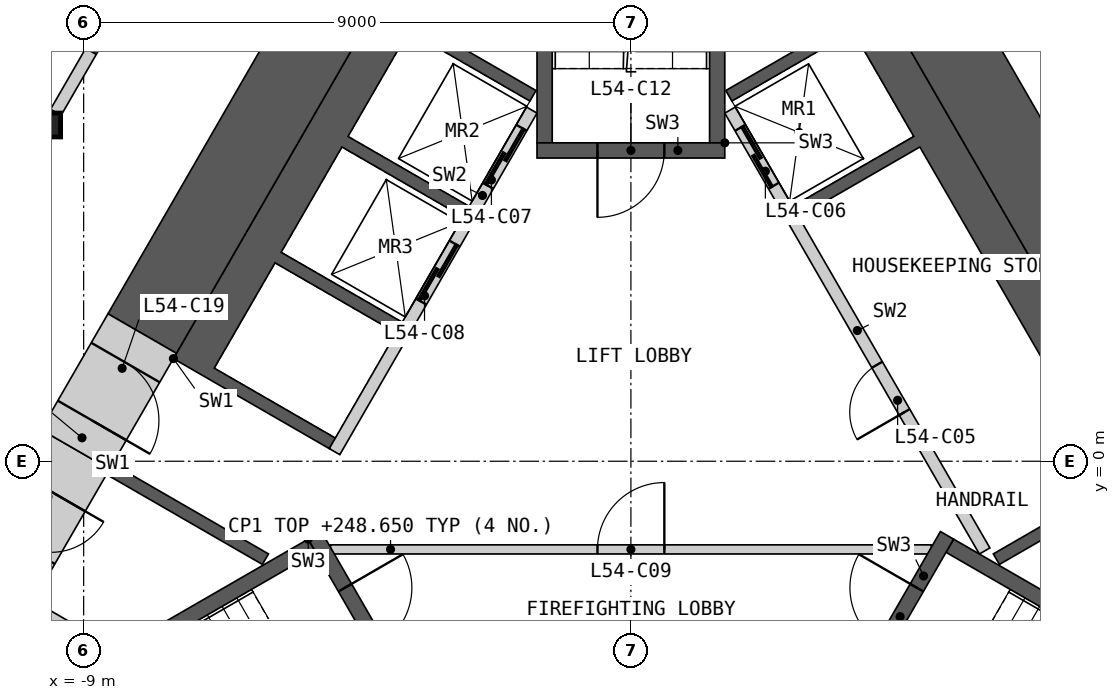
"""IFC4 building model, lengths in metres.
Left out: names, types, materials, properties, quantities, classifications, styles, units other than length and angle.
Written with IfcOpenShell. Run it as: python <this file> out.ifc"""

import sys

from ifc_helpers import new_model, si_unit, direction, frame, frame_2d, origin, origin_2d, place, context, subcontext, project, spatial, polyline, rectangle, i_section, outline, extrude, element, fill, save


model = new_model("IFC4")
c1 = context("Model", 3, precision=1e-05, world=origin(), true_north=direction((0.0, 1.0)))
c2 = subcontext(c1, "Body", "Model", "MODEL_VIEW")
j1 = project(units=[si_unit("LENGTHUNIT", "METRE"), si_unit("PLANEANGLEUNIT", "RADIAN")], contexts=[c1])
p1 = place(None, origin())
s1 = spatial("IfcSite", under=j1, at=p1, CompositionType="ELEMENT")
p2 = place(p1, origin())
s2 = spatial("IfcBuilding", under=s1, at=p2, CompositionType="ELEMENT")
p3 = place(p2, frame((0.0, 0.0, 245.4)))
s3 = spatial("IfcBuildingStorey", under=s2, at=p3, CompositionType="ELEMENT", Elevation=245.4)
p4 = place(p3, frame((-9.578, 5.53, 0.0), z_axis=(0.0, 0.0, 1.0), x_axis=(1.0, 0.0, 0.0)))
e1 = element("IfcColumn", 1, at=p4, inside=s3, PredefinedType="COLUMN", context=c2, shape_type="SweptSolid", body=[
    extrude(i_section(OverallWidth=0.399, OverallDepth=0.393, WebThickness=0.023, FlangeThickness=0.037, at=origin_2d()), origin(), (0.0, 0.0, 1.0), 3.6),
])
p5 = place(p3, origin())
e2 = element("IfcWall", 2, at=p5, inside=s3, PredefinedType="SHEAR", context=c2, shape_type="SweptSolid", body=[
    extrude(outline(polyline([(4.124, 7.577), (8.624, -0.217), (8.231, -0.444), (6.061, -1.697), (5.96, -1.524), (7.952, -0.374), (4.752, 5.169), (2.76, 4.019), (2.66, 4.192), (4.652, 5.342), (3.652, 7.074), (1.66, 5.924), (1.561, 6.097), (3.731, 7.35), (4.124, 7.577)])), origin(), (0.0, 0.0, 1.0), 3.25),
])
p6 = place(p3, frame((5.817, -1.476, 0.0), z_axis=(0.0, 0.0, 1.0), x_axis=(-0.500002616675, 0.866023893041, 0.0)))
e3 = element("IfcWall", 3, at=p6, inside=s3, PredefinedType="SOLIDWALL", context=c2, shape_type="SweptSolid", body=[
    extrude(rectangle(XDim=8.373, YDim=0.2, at=frame_2d((4.187, 0.0))), origin(), (0.0, 0.0, 1.0), 3.25),
])
p7 = place(p6, frame((2.637, 0.0, 0.0)))
e4 = element("IfcOpeningElement", 4, at=p7, cuts=e3, PredefinedType="OPENING", context=c2, shape_type="SweptSolid", body=[
    extrude(rectangle(XDim=0.9, YDim=2.1, at=frame_2d((0.45, 1.05))), frame((0.0, 0.11, 0.0), z_axis=(0.0, -1.0, 0.0), x_axis=(1.0, 0.0, 0.0)), (0.0, 0.0, 1.0), 0.22),
])
p8 = place(p6, frame((6.937, 0.0, 0.0)))
e5 = element("IfcOpeningElement", 5, at=p8, cuts=e3, PredefinedType="OPENING", context=c2, shape_type="SweptSolid", body=[
    extrude(rectangle(XDim=1.1, YDim=2.1, at=frame_2d((0.55, 1.05))), frame((0.0, 0.11, 0.0), z_axis=(0.0, -1.0, 0.0), x_axis=(1.0, 0.0, 0.0)), (0.0, 0.0, 1.0), 0.22),
])
p9 = place(p3, origin())
e6 = element("IfcWall", 6, at=p9, inside=s3, PredefinedType="SHEAR", context=c2, shape_type="SweptSolid", body=[
    extrude(outline(polyline([(-7.524, 1.688), (-4.124, 7.577), (-3.731, 7.35), (-1.561, 6.097), (-1.66, 5.924), (-3.652, 7.074), (-4.652, 5.342), (-2.66, 4.192), (-2.76, 4.019), (-4.752, 5.169), (-5.752, 3.437), (-3.76, 2.287), (-3.861, 2.113), (-5.852, 3.263), (-6.852, 1.531), (-4.861, 0.381), (-4.96, 0.208), (-7.131, 1.461), (-7.524, 1.688)])), origin(), (0.0, 0.0, 1.0), 3.25),
])
p10 = place(p3, origin())
e7 = element("IfcWall", 7, at=p10, inside=s3, PredefinedType="SHEAR", context=c2, shape_type="SweptSolid", body=[
    extrude(outline(polyline([(-8.524, -0.044), (-8.131, -0.271), (-5.96, -1.524), (-6.061, -1.697), (-8.231, -0.444), (-8.624, -0.217), (-8.524, -0.044)])), origin(), (0.0, 0.0, 1.0), 3.25),
])
p11 = place(p3, frame((-1.631, 5.776, 0.0), z_axis=(0.0, 0.0, 1.0), x_axis=(-0.499992876559, -0.866029516466, 0.0)))
e8 = element("IfcWall", 8, at=p11, inside=s3, PredefinedType="SOLIDWALL", context=c2, shape_type="SweptSolid", body=[
    extrude(rectangle(XDim=6.486, YDim=0.2, at=frame_2d((3.243, 0.0))), origin(), (0.0, 0.0, 1.0), 3.25),
])
p12 = place(p11, frame((0.337, 0.0, 0.0)))
e9 = element("IfcOpeningElement", 9, at=p12, cuts=e8, PredefinedType="OPENING", context=c2, shape_type="SweptSolid", body=[
    extrude(rectangle(XDim=1.1, YDim=2.1, at=frame_2d((0.55, 1.05))), frame((0.0, 0.11, 0.0), z_axis=(0.0, -1.0, 0.0), x_axis=(1.0, 0.0, 0.0)), (0.0, 0.0, 1.0), 0.22),
])
p13 = place(p11, frame((2.537, 0.0, 0.0)))
e10 = element("IfcOpeningElement", 10, at=p13, cuts=e8, PredefinedType="OPENING", context=c2, shape_type="SweptSolid", body=[
    extrude(rectangle(XDim=1.1, YDim=2.1, at=frame_2d((0.55, 1.05))), frame((0.0, 0.11, 0.0), z_axis=(0.0, -1.0, 0.0), x_axis=(1.0, 0.0, 0.0)), (0.0, 0.0, 1.0), 0.22),
])
p14 = place(p3, frame((-4.941, -1.45, 0.0), z_axis=(0.0, 0.0, 1.0), x_axis=(1.0, 0.0, 0.0)))
e11 = element("IfcWall", 11, at=p14, inside=s3, PredefinedType="PARTITIONING", context=c2, shape_type="SweptSolid", body=[
    extrude(rectangle(XDim=9.882, YDim=0.15, at=frame_2d((4.941, 0.0))), origin(), (0.0, 0.0, 1.0), 3.25),
])
p15 = place(p14, frame((4.391, 0.0, 0.0)))
e12 = element("IfcOpeningElement", 12, at=p15, cuts=e11, PredefinedType="OPENING", context=c2, shape_type="SweptSolid", body=[
    extrude(rectangle(XDim=1.1, YDim=2.1, at=frame_2d((0.55, 1.05))), frame((0.0, 0.085, 0.0), z_axis=(0.0, -1.0, 0.0), x_axis=(1.0, 0.0, 0.0)), (0.0, 0.0, 1.0), 0.17),
])
p16 = place(p3, origin())
e13 = element("IfcWall", 13, at=p16, inside=s3, PredefinedType="SHEAR", context=c2, shape_type="SweptSolid", body=[
    extrude(outline(polyline([(-5.307, -1.281), (-10.374, -4.206), (-10.032, -4.298), (-5.182, -1.498), (-5.307, -1.281)])), origin(), (0.0, 0.0, 1.0), 3.25),
])
p17 = place(p3, frame((-5.199, -1.219, 0.0), z_axis=(0.0, 0.0, 1.0), x_axis=(0.499982516597, -0.866035497597, 0.0)))
e14 = element("IfcWall", 14, at=p17, inside=s3, PredefinedType="SHEAR", context=c2, shape_type="SweptSolid", body=[
    extrude(rectangle(XDim=3.088, YDim=0.25, at=frame_2d((1.544, 0.0))), origin(), (0.0, 0.0, 1.0), 3.25),
])
p18 = place(p17, frame((0.994, 0.0, 0.0)))
e15 = element("IfcOpeningElement", 15, at=p18, cuts=e14, PredefinedType="OPENING", context=c2, shape_type="SweptSolid", body=[
    extrude(rectangle(XDim=1.1, YDim=2.1, at=frame_2d((0.55, 1.05))), frame((0.0, 0.135, 0.0), z_axis=(0.0, -1.0, 0.0), x_axis=(1.0, 0.0, 0.0)), (0.0, 0.0, 1.0), 0.27),
])
p19 = place(p3, origin())
e16 = element("IfcWall", 16, at=p19, inside=s3, PredefinedType="SHEAR", context=c2, shape_type="SweptSolid", body=[
    extrude(outline(polyline([(10.032, -4.298), (10.374, -4.206), (5.307, -1.281), (5.182, -1.498), (10.032, -4.298)])), origin(), (0.0, 0.0, 1.0), 3.25),
])
p20 = place(p3, frame((3.655, -3.893, 0.0), z_axis=(0.0, 0.0, 1.0), x_axis=(0.499982516597, 0.866035497597, 0.0)))
e17 = element("IfcWall", 17, at=p20, inside=s3, PredefinedType="SHEAR", context=c2, shape_type="SweptSolid", body=[
    extrude(rectangle(XDim=3.088, YDim=0.25, at=frame_2d((1.544, 0.0))), origin(), (0.0, 0.0, 1.0), 3.25),
])
p21 = place(p20, frame((0.994, 0.0, 0.0)))
e18 = element("IfcOpeningElement", 18, at=p21, cuts=e17, PredefinedType="OPENING", context=c2, shape_type="SweptSolid", body=[
    extrude(rectangle(XDim=1.1, YDim=2.1, at=frame_2d((0.55, 1.05))), frame((0.0, 0.135, 0.0), z_axis=(0.0, -1.0, 0.0), x_axis=(1.0, 0.0, 0.0)), (0.0, 0.0, 1.0), 0.27),
])
p22 = place(p3, origin())
e19 = element("IfcWall", 19, at=p22, inside=s3, PredefinedType="SHEAR", context=c2, shape_type="SweptSolid", body=[
    extrude(outline(polyline([(1.544, 5.237), (1.544, 11.087), (1.294, 10.837), (1.294, 5.237), (1.544, 5.237)])), origin(), (0.0, 0.0, 1.0), 3.25),
])
p23 = place(p3, origin())
e20 = element("IfcWall", 20, at=p23, inside=s3, PredefinedType="SHEAR", context=c2, shape_type="SweptSolid", body=[
    extrude(outline(polyline([(-1.294, 10.837), (-1.544, 11.087), (-1.544, 5.237), (-1.294, 5.237), (-1.294, 10.837)])), origin(), (0.0, 0.0, 1.0), 3.25),
])
p24 = place(p3, frame((1.544, 5.112, 0.0), z_axis=(0.0, 0.0, 1.0), x_axis=(-1.0, 0.0, 0.0)))
e21 = element("IfcWall", 21, at=p24, inside=s3, PredefinedType="SHEAR", context=c2, shape_type="SweptSolid", body=[
    extrude(rectangle(XDim=3.088, YDim=0.25, at=frame_2d((1.544, 0.0))), origin(), (0.0, 0.0, 1.0), 3.25),
])
p25 = place(p24, frame((0.994, 0.0, 0.0)))
e22 = element("IfcOpeningElement", 22, at=p25, cuts=e21, PredefinedType="OPENING", context=c2, shape_type="SweptSolid", body=[
    extrude(rectangle(XDim=1.1, YDim=2.1, at=frame_2d((0.55, 1.05))), frame((0.0, 0.135, 0.0), z_axis=(0.0, -1.0, 0.0), x_axis=(1.0, 0.0, 0.0)), (0.0, 0.0, 1.0), 0.27),
])
p26 = place(p3, frame((-9.862, -2.361, 0.0), z_axis=(0.0, 0.0, 1.0), x_axis=(0.865990094875, -0.500061151839, 0.0)))
e23 = element("IfcWall", 23, at=p26, inside=s3, PredefinedType="PARTITIONING", context=c2, shape_type="SweptSolid", body=[
    extrude(rectangle(XDim=1.56, YDim=0.15, at=frame_2d((0.78, 0.0))), origin(), (0.0, 0.0, 1.0), 3.25),
])
p27 = place(p3, frame((10.062, -1.408, 0.0), z_axis=(0.0, 0.0, 1.0), x_axis=(-0.500000545805, 0.866025088663, 0.0)))
e24 = element("IfcWall", 24, at=p27, inside=s3, PredefinedType="SHEAR", context=c2, shape_type="SweptSolid", body=[
    extrude(rectangle(XDim=12.539, YDim=1.3, at=frame_2d((6.27, 0.0))), origin(), (0.0, 0.0, 1.0), 3.25),
])
p28 = place(p3, frame((-3.812, 9.418, 0.0), z_axis=(0.0, 0.0, 1.0), x_axis=(-0.499995037753, -0.86602826872, 0.0)))
e25 = element("IfcWall", 25, at=p28, inside=s3, PredefinedType="SHEAR", context=c2, shape_type="SweptSolid", body=[
    extrude(rectangle(XDim=8.451, YDim=1.3, at=frame_2d((4.225, 0.0))), origin(), (0.0, 0.0, 1.0), 3.25),
])
p29 = place(p3, frame((-9.137, 0.195, 0.0), z_axis=(0.0, 0.0, 1.0), x_axis=(-0.500009943768, -0.866019662671, 0.0)))
e26 = element("IfcWall", 26, at=p29, inside=s3, PredefinedType="SHEAR", context=c2, shape_type="SweptSolid", body=[
    extrude(rectangle(XDim=2.401, YDim=1.3, at=frame_2d((1.201, 0.0))), origin(), (0.0, 0.0, 1.0), 3.25),
])
p30 = place(p29, frame((0.8, 0.0, 0.0)))
e27 = element("IfcOpeningElement", 27, at=p30, cuts=e26, PredefinedType="OPENING", context=c2, shape_type="SweptSolid", body=[
    extrude(rectangle(XDim=1.0, YDim=2.1, at=frame_2d((0.5, 1.05))), frame((0.0, 0.66, 0.0), z_axis=(0.0, -1.0, 0.0), x_axis=(1.0, 0.0, 0.0)), (0.0, 0.0, 1.0), 1.32),
])
p31 = place(p3, frame((-8.037, 2.1, 0.0), z_axis=(0.0, 0.0, 1.0), x_axis=(-0.50002983664, -0.866008176907, 0.0)))
e28 = element("IfcWall", 28, at=p31, inside=s3, PredefinedType="SHEAR", context=c2, shape_type="SweptSolid", body=[
    extrude(rectangle(XDim=2.2, YDim=1.3, at=frame_2d((1.1, 0.0))), origin(), (0.0, 0.0, 1.0), 3.25),
])
p32 = place(p31, frame((0.55, 0.0, 0.0)))
e29 = element("IfcOpeningElement", 29, at=p32, cuts=e28, PredefinedType="OPENING", context=c2, shape_type="SweptSolid", body=[
    extrude(rectangle(XDim=1.1, YDim=2.1, at=frame_2d((0.55, 1.05))), frame((0.0, 0.66, 0.0), z_axis=(0.0, -1.0, 0.0), x_axis=(1.0, 0.0, 0.0)), (0.0, 0.0, 1.0), 1.32),
])
p33 = place(p3, frame((4.91, 13.616, 0.0), z_axis=(0.0, 0.0, 1.0), x_axis=(0.50000207303, -0.866024206917, 0.0)))
e30 = element("IfcWall", 30, at=p33, inside=s3, PredefinedType="PARTITIONING", context=c2, shape_type="SweptSolid", body=[
    extrude(rectangle(XDim=9.095, YDim=0.2, at=frame_2d((4.547, 0.0))), origin(), (0.0, 0.0, 1.0), 3.25),
])
p34 = place(p33, frame((5.726, 0.0, 0.0)))
e31 = element("IfcOpeningElement", 31, at=p34, cuts=e30, PredefinedType="OPENING", context=c2, shape_type="SweptSolid", body=[
    extrude(rectangle(XDim=1.8, YDim=2.1, at=frame_2d((0.9, 1.05))), frame((0.0, 0.11, 0.0), z_axis=(0.0, -1.0, 0.0), x_axis=(1.0, 0.0, 0.0)), (0.0, 0.0, 1.0), 0.22),
])
p35 = place(p3, frame((-9.458, 5.74, 0.0), z_axis=(0.0, 0.0, 1.0), x_axis=(0.50000207303, 0.866024206917, 0.0)))
e32 = element("IfcWall", 32, at=p35, inside=s3, PredefinedType="PARTITIONING", context=c2, shape_type="SweptSolid", body=[
    extrude(rectangle(XDim=9.095, YDim=0.2, at=frame_2d((4.547, 0.0))), origin(), (0.0, 0.0, 1.0), 3.25),
])
p36 = place(p35, frame((1.162, 0.0, 0.0)))
e33 = element("IfcOpeningElement", 33, at=p36, cuts=e32, PredefinedType="OPENING", context=c2, shape_type="SweptSolid", body=[
    extrude(rectangle(XDim=1.1, YDim=2.1, at=frame_2d((0.55, 1.05))), frame((0.0, 0.11, 0.0), z_axis=(0.0, -1.0, 0.0), x_axis=(1.0, 0.0, 0.0)), (0.0, 0.0, 1.0), 0.22),
])
p37 = place(p7, origin())
e34 = element("IfcDoor", 34, at=p37, inside=s3, OperationType="SINGLE_SWING_LEFT", PredefinedType="DOOR", context=c2, shape_type="SweptSolid", body=[
    extrude(rectangle(XDim=0.9, YDim=2.1, at=frame_2d((0.45, 1.05))), frame((0.0, 0.025, 0.0), z_axis=(0.0, -1.0, 0.0), x_axis=(1.0, 0.0, 0.0)), (0.0, 0.0, 1.0), 0.05),
])
fill(e4, e34)
p38 = place(p8, origin())
e35 = element("IfcDoor", 35, at=p38, inside=s3, OperationType="SLIDING_TO_LEFT", PredefinedType="DOOR", context=c2, shape_type="SweptSolid", body=[
    extrude(rectangle(XDim=1.1, YDim=2.1, at=frame_2d((0.55, 1.05))), frame((0.0, 0.025, 0.0), z_axis=(0.0, -1.0, 0.0), x_axis=(1.0, 0.0, 0.0)), (0.0, 0.0, 1.0), 0.05),
])
fill(e5, e35)
p39 = place(p12, origin())
e36 = element("IfcDoor", 36, at=p39, inside=s3, OperationType="SLIDING_TO_LEFT", PredefinedType="DOOR", context=c2, shape_type="SweptSolid", body=[
    extrude(rectangle(XDim=1.1, YDim=2.1, at=frame_2d((0.55, 1.05))), frame((0.0, 0.025, 0.0), z_axis=(0.0, -1.0, 0.0), x_axis=(1.0, 0.0, 0.0)), (0.0, 0.0, 1.0), 0.05),
])
fill(e9, e36)
p40 = place(p13, origin())
e37 = element("IfcDoor", 37, at=p40, inside=s3, OperationType="SLIDING_TO_LEFT", PredefinedType="DOOR", context=c2, shape_type="SweptSolid", body=[
    extrude(rectangle(XDim=1.1, YDim=2.1, at=frame_2d((0.55, 1.05))), frame((0.0, 0.025, 0.0), z_axis=(0.0, -1.0, 0.0), x_axis=(1.0, 0.0, 0.0)), (0.0, 0.0, 1.0), 0.05),
])
fill(e10, e37)
p41 = place(p15, origin())
e38 = element("IfcDoor", 38, at=p41, inside=s3, OperationType="SINGLE_SWING_RIGHT", PredefinedType="DOOR", context=c2, shape_type="SweptSolid", body=[
    extrude(rectangle(XDim=1.1, YDim=2.1, at=frame_2d((0.55, 1.05))), frame((0.0, 0.025, 0.0), z_axis=(0.0, -1.0, 0.0), x_axis=(1.0, 0.0, 0.0)), (0.0, 0.0, 1.0), 0.05),
])
fill(e12, e38)
p42 = place(p18, origin())
e39 = element("IfcDoor", 39, at=p42, inside=s3, OperationType="SINGLE_SWING_LEFT", PredefinedType="DOOR", context=c2, shape_type="SweptSolid", body=[
    extrude(rectangle(XDim=1.1, YDim=2.1, at=frame_2d((0.55, 1.05))), frame((0.0, 0.025, 0.0), z_axis=(0.0, -1.0, 0.0), x_axis=(1.0, 0.0, 0.0)), (0.0, 0.0, 1.0), 0.05),
])
fill(e15, e39)
p43 = place(p21, origin())
e40 = element("IfcDoor", 40, at=p43, inside=s3, OperationType="SINGLE_SWING_RIGHT", PredefinedType="DOOR", context=c2, shape_type="SweptSolid", body=[
    extrude(rectangle(XDim=1.1, YDim=2.1, at=frame_2d((0.55, 1.05))), frame((0.0, 0.025, 0.0), z_axis=(0.0, -1.0, 0.0), x_axis=(1.0, 0.0, 0.0)), (0.0, 0.0, 1.0), 0.05),
])
fill(e18, e40)
p44 = place(p25, origin())
e41 = element("IfcDoor", 41, at=p44, inside=s3, OperationType="SINGLE_SWING_RIGHT", PredefinedType="DOOR", context=c2, shape_type="SweptSolid", body=[
    extrude(rectangle(XDim=1.1, YDim=2.1, at=frame_2d((0.55, 1.05))), frame((0.0, 0.025, 0.0), z_axis=(0.0, -1.0, 0.0), x_axis=(1.0, 0.0, 0.0)), (0.0, 0.0, 1.0), 0.05),
])
fill(e22, e41)
p45 = place(p30, origin())
e42 = element("IfcDoor", 42, at=p45, inside=s3, OperationType="SINGLE_SWING_LEFT", PredefinedType="DOOR", context=c2, shape_type="SweptSolid", body=[
    extrude(rectangle(XDim=1.0, YDim=2.1, at=frame_2d((0.5, 1.05))), frame((0.0, 0.405, 0.0), z_axis=(0.0, -1.0, 0.0), x_axis=(1.0, 0.0, 0.0)), (0.0, 0.0, 1.0), 0.05),
])
fill(e27, e42)
p46 = place(p32, origin())
e43 = element("IfcDoor", 43, at=p46, inside=s3, OperationType="SINGLE_SWING_RIGHT", PredefinedType="DOOR", context=c2, shape_type="SweptSolid", body=[
    extrude(rectangle(XDim=1.1, YDim=2.1, at=frame_2d((0.55, 1.05))), frame((0.0, 0.405, 0.0), z_axis=(0.0, -1.0, 0.0), x_axis=(1.0, 0.0, 0.0)), (0.0, 0.0, 1.0), 0.05),
])
fill(e29, e43)
save(model, sys.argv[1])
